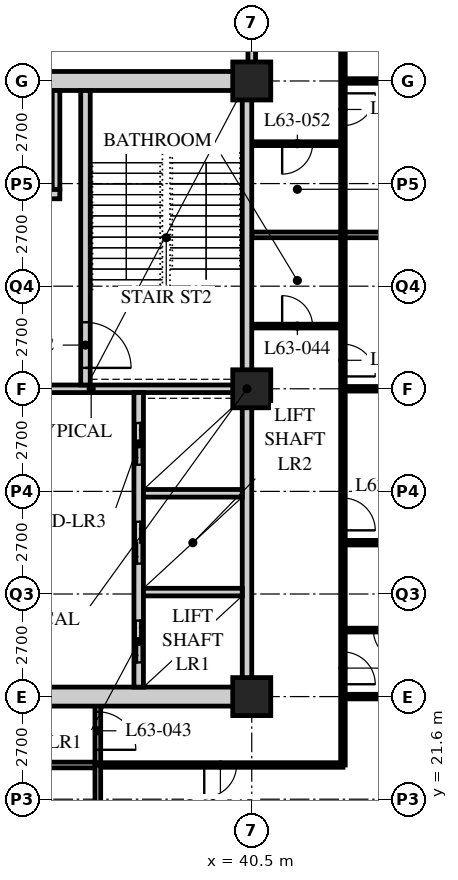
"""IFC4 building model, lengths in metres.
Left out: names, types, materials, properties, quantities, classifications, styles, units other than length and angle.
Written with IfcOpenShell. Run it as: python <this file> out.ifc"""

import sys

from ifc_helpers import new_model, si_unit, direction, frame, frame_2d, origin, origin_2d, place, context, subcontext, project, spatial, rectangle, hollow_rectangle, extrude, element, fill, save


model = new_model("IFC4")
c1 = context("Model", 3, precision=1e-05, world=origin(), true_north=direction((0.0, 1.0)))
c2 = subcontext(c1, "Body", "Model", "MODEL_VIEW")
j1 = project(units=[si_unit("LENGTHUNIT", "METRE"), si_unit("PLANEANGLEUNIT", "RADIAN")], contexts=[c1])
p1 = place(None, origin())
s1 = spatial("IfcSite", under=j1, at=p1, CompositionType="ELEMENT")
p2 = place(p1, origin())
s2 = spatial("IfcBuilding", under=s1, at=p2, CompositionType="ELEMENT")
p3 = place(p2, frame((0.0, 0.0, 246.3)))
s3 = spatial("IfcBuildingStorey", under=s2, at=p3, CompositionType="ELEMENT", Elevation=246.3)
for number, where, z_axis, x_axis in (
    (1, (40.5, 24.3, 0.0), (0.0, 0.0, 1.0), (1.0, 0.0, 0.0)),
    (2, (40.5, 32.4, 0.0), (0.0, 0.0, 1.0), (1.0, 0.0, 0.0)),
    (3, (40.5, 40.5, 0.0), (0.0, 0.0, 1.0), (1.0, 0.0, 0.0)),
):
    element("IfcColumn", number, at=place(p3, frame(where, z_axis=z_axis, x_axis=x_axis)), inside=s3, PredefinedType="COLUMN", context=c2, shape_type="SweptSolid", body=[
        extrude(hollow_rectangle(XDim=1.0, YDim=1.0, WallThickness=0.1, at=origin_2d()), origin(), (0.0, 0.0, 1.0), 3.9),
    ])
p4 = place(p3, frame((12.15, 22.5, 0.0), z_axis=(0.0, 0.0, 1.0), x_axis=(1.0, 0.0, 0.0)))
e4 = element("IfcWall", 4, at=p4, inside=s3, PredefinedType="PARTITIONING", context=c2, shape_type="SweptSolid", body=[
    extrude(rectangle(XDim=24.3, YDim=0.15, at=frame_2d((12.15, 0.0))), origin(), (0.0, 0.0, 1.0), 3.69),
])
p5 = place(p4, frame((6.4, 0.0, 0.0)))
e5 = element("IfcOpeningElement", 5, at=p5, cuts=e4, PredefinedType="OPENING", context=c2, shape_type="SweptSolid", body=[
    extrude(rectangle(XDim=1.0, YDim=2.1, at=frame_2d((0.5, 1.05))), frame((0.0, 0.085, 0.0), z_axis=(0.0, -1.0, 0.0), x_axis=(1.0, 0.0, 0.0)), (0.0, 0.0, 1.0), 0.17),
])
p6 = place(p4, frame((8.5, 0.0, 0.0)))
e6 = element("IfcOpeningElement", 6, at=p6, cuts=e4, PredefinedType="OPENING", context=c2, shape_type="SweptSolid", body=[
    extrude(rectangle(XDim=1.0, YDim=2.1, at=frame_2d((0.5, 1.05))), frame((0.0, 0.085, 0.0), z_axis=(0.0, -1.0, 0.0), x_axis=(1.0, 0.0, 0.0)), (0.0, 0.0, 1.0), 0.17),
])
p7 = place(p4, frame((16.6, 0.0, 0.0)))
e7 = element("IfcOpeningElement", 7, at=p7, cuts=e4, PredefinedType="OPENING", context=c2, shape_type="SweptSolid", body=[
    extrude(rectangle(XDim=1.0, YDim=2.1, at=frame_2d((0.5, 1.05))), frame((0.0, 0.085, 0.0), z_axis=(0.0, -1.0, 0.0), x_axis=(1.0, 0.0, 0.0)), (0.0, 0.0, 1.0), 0.17),
])
p8 = place(p4, frame((2.625, 0.0, 0.0)))
e8 = element("IfcOpeningElement", 8, at=p8, cuts=e4, PredefinedType="OPENING", context=c2, shape_type="SweptSolid", body=[
    extrude(rectangle(XDim=1.0, YDim=2.1, at=frame_2d((0.5, 1.05))), frame((0.0, 0.085, 0.0), z_axis=(0.0, -1.0, 0.0), x_axis=(1.0, 0.0, 0.0)), (0.0, 0.0, 1.0), 0.17),
])
p9 = place(p3, frame((36.45, 22.5, 0.0), z_axis=(0.0, 0.0, 1.0), x_axis=(0.0, 1.0, 0.0)))
e9 = element("IfcWall", 9, at=p9, inside=s3, PredefinedType="PARTITIONING", context=c2, shape_type="SweptSolid", body=[
    extrude(rectangle(XDim=1.8, YDim=0.15, at=frame_2d((0.9, 0.0))), origin(), (0.0, 0.0, 1.0), 3.69),
])
p10 = place(p9, frame((0.4, 0.0, 0.0)))
e10 = element("IfcOpeningElement", 10, at=p10, cuts=e9, PredefinedType="OPENING", context=c2, shape_type="SweptSolid", body=[
    extrude(rectangle(XDim=1.0, YDim=2.1, at=frame_2d((0.5, 1.05))), frame((0.0, 0.085, 0.0), z_axis=(0.0, -1.0, 0.0), x_axis=(1.0, 0.0, 0.0)), (0.0, 0.0, 1.0), 0.17),
])
p11 = place(p3, frame((40.5, 40.5, 0.0), z_axis=(0.0, 0.0, 1.0), x_axis=(0.0, 1.0, 0.0)))
e11 = element("IfcWall", 11, at=p11, inside=s3, PredefinedType="SOLIDWALL", context=c2, shape_type="SweptSolid", body=[
    extrude(rectangle(XDim=10.35, YDim=0.2, at=frame_2d((5.175, 0.0))), origin(), (0.0, 0.0, 1.0), 3.078),
])
p12 = place(p3, frame((40.5, 34.05, 0.0), z_axis=(0.0, 0.0, 1.0), x_axis=(1.0, 0.0, 0.0)))
e12 = element("IfcWall", 12, at=p12, inside=s3, PredefinedType="PARTITIONING", context=c2, shape_type="SweptSolid", body=[
    extrude(rectangle(XDim=2.4, YDim=0.1, at=frame_2d((1.2, 0.0))), origin(), (0.0, 0.0, 1.0), 3.69),
])
p13 = place(p12, frame((0.8, 0.0, 0.0)))
e13 = element("IfcOpeningElement", 13, at=p13, cuts=e12, PredefinedType="OPENING", context=c2, shape_type="SweptSolid", body=[
    extrude(rectangle(XDim=0.8, YDim=2.1, at=frame_2d((0.4, 1.05))), frame((0.0, 0.06, 0.0), z_axis=(0.0, -1.0, 0.0), x_axis=(1.0, 0.0, 0.0)), (0.0, 0.0, 1.0), 0.12),
])
p14 = place(p3, frame((42.9, 22.5, 0.0), z_axis=(0.0, 0.0, 1.0), x_axis=(0.0, 1.0, 0.0)))
e14 = element("IfcWall", 14, at=p14, inside=s3, PredefinedType="PARTITIONING", context=c2, shape_type="SweptSolid", body=[
    extrude(rectangle(XDim=13.95, YDim=0.12, at=frame_2d((6.975, 0.0))), origin(), (0.0, 0.0, 1.0), 3.69),
])
p15 = place(p14, frame((2.125, 0.0, 0.0)))
e15 = element("IfcOpeningElement", 15, at=p15, cuts=e14, PredefinedType="OPENING", context=c2, shape_type="SweptSolid", body=[
    extrude(rectangle(XDim=0.85, YDim=2.1, at=frame_2d((0.425, 1.05))), frame((0.0, 0.07, 0.0), z_axis=(0.0, -1.0, 0.0), x_axis=(1.0, 0.0, 0.0)), (0.0, 0.0, 1.0), 0.14),
])
p16 = place(p14, frame((6.175, 0.0, 0.0)))
e16 = element("IfcOpeningElement", 16, at=p16, cuts=e14, PredefinedType="OPENING", context=c2, shape_type="SweptSolid", body=[
    extrude(rectangle(XDim=0.85, YDim=2.1, at=frame_2d((0.425, 1.05))), frame((0.0, 0.07, 0.0), z_axis=(0.0, -1.0, 0.0), x_axis=(1.0, 0.0, 0.0)), (0.0, 0.0, 1.0), 0.14),
])
p17 = place(p14, frame((10.225, 0.0, 0.0)))
e17 = element("IfcOpeningElement", 17, at=p17, cuts=e14, PredefinedType="OPENING", context=c2, shape_type="SweptSolid", body=[
    extrude(rectangle(XDim=0.85, YDim=2.1, at=frame_2d((0.425, 1.05))), frame((0.0, 0.07, 0.0), z_axis=(0.0, -1.0, 0.0), x_axis=(1.0, 0.0, 0.0)), (0.0, 0.0, 1.0), 0.14),
])
p18 = place(p3, frame((36.45, 22.5, 0.0), z_axis=(0.0, 0.0, 1.0), x_axis=(1.0, 0.0, 0.0)))
e18 = element("IfcWall", 18, at=p18, inside=s3, PredefinedType="PARTITIONING", context=c2, shape_type="SweptSolid", body=[
    extrude(rectangle(XDim=6.45, YDim=0.12, at=frame_2d((3.225, 0.0))), origin(), (0.0, 0.0, 1.0), 3.69),
])
p19 = place(p18, frame((2.8, 0.0, 0.0)))
e19 = element("IfcOpeningElement", 19, at=p19, cuts=e18, PredefinedType="OPENING", context=c2, shape_type="SweptSolid", body=[
    extrude(rectangle(XDim=0.85, YDim=2.1, at=frame_2d((0.425, 1.05))), frame((0.0, 0.07, 0.0), z_axis=(0.0, -1.0, 0.0), x_axis=(1.0, 0.0, 0.0)), (0.0, 0.0, 1.0), 0.14),
])
p20 = place(p3, frame((42.9, 24.3, 0.0), z_axis=(0.0, 0.0, 1.0), x_axis=(1.0, 0.0, 0.0)))
e20 = element("IfcWall", 20, at=p20, inside=s3, PredefinedType="PARTITIONING", context=c2, shape_type="SweptSolid", body=[
    extrude(rectangle(XDim=9.45, YDim=0.12, at=frame_2d((4.725, 0.0))), origin(), (0.0, 0.0, 1.0), 3.078),
])
p21 = place(p3, frame((40.5, 36.45, 0.0), z_axis=(0.0, 0.0, 1.0), x_axis=(1.0, 0.0, 0.0)))
e21 = element("IfcWall", 21, at=p21, inside=s3, PredefinedType="PARTITIONING", context=c2, shape_type="SweptSolid", body=[
    extrude(rectangle(XDim=15.9, YDim=0.15, at=frame_2d((7.95, 0.0))), origin(), (0.0, 0.0, 1.0), 3.69),
])
p22 = place(p3, frame((36.45, 16.5, 0.0), z_axis=(0.0, 0.0, 1.0), x_axis=(0.0, 1.0, 0.0)))
e22 = element("IfcWall", 22, at=p22, inside=s3, PredefinedType="PARTITIONING", context=c2, shape_type="SweptSolid", body=[
    extrude(rectangle(XDim=6.0, YDim=0.15, at=frame_2d((3.0, 0.0))), origin(), (0.0, 0.0, 1.0), 3.69),
])
p23 = place(p3, frame((42.9, 26.05, 0.0), z_axis=(0.0, 0.0, 1.0), x_axis=(1.0, 0.0, 0.0)))
e23 = element("IfcWall", 23, at=p23, inside=s3, PredefinedType="PARTITIONING", context=c2, shape_type="SweptSolid", body=[
    extrude(rectangle(XDim=2.4, YDim=0.1, at=frame_2d((1.2, 0.0))), origin(), (0.0, 0.0, 1.0), 3.69),
])
p24 = place(p23, frame((0.8, 0.0, 0.0)))
e24 = element("IfcOpeningElement", 24, at=p24, cuts=e23, PredefinedType="OPENING", context=c2, shape_type="SweptSolid", body=[
    extrude(rectangle(XDim=0.8, YDim=2.1, at=frame_2d((0.4, 1.05))), frame((0.0, 0.06, 0.0), z_axis=(0.0, -1.0, 0.0), x_axis=(1.0, 0.0, 0.0)), (0.0, 0.0, 1.0), 0.12),
])
p25 = place(p3, frame((42.9, 28.35, 0.0), z_axis=(0.0, 0.0, 1.0), x_axis=(1.0, 0.0, 0.0)))
e25 = element("IfcWall", 25, at=p25, inside=s3, PredefinedType="PARTITIONING", context=c2, shape_type="SweptSolid", body=[
    extrude(rectangle(XDim=13.5, YDim=0.12, at=frame_2d((6.75, 0.0))), origin(), (0.0, 0.0, 1.0), 3.69),
])
p26 = place(p3, frame((42.9, 32.4, 0.0), z_axis=(0.0, 0.0, 1.0), x_axis=(1.0, 0.0, 0.0)))
e26 = element("IfcWall", 26, at=p26, inside=s3, PredefinedType="PARTITIONING", context=c2, shape_type="SweptSolid", body=[
    extrude(rectangle(XDim=13.5, YDim=0.12, at=frame_2d((6.75, 0.0))), origin(), (0.0, 0.0, 1.0), 3.078),
])
p27 = place(p3, frame((40.5, 38.85, 0.0), z_axis=(0.0, 0.0, 1.0), x_axis=(1.0, 0.0, 0.0)))
e27 = element("IfcWall", 27, at=p27, inside=s3, PredefinedType="PARTITIONING", context=c2, shape_type="SweptSolid", body=[
    extrude(rectangle(XDim=2.4, YDim=0.1, at=frame_2d((1.2, 0.0))), origin(), (0.0, 0.0, 1.0), 3.69),
])
p28 = place(p27, frame((0.8, 0.0, 0.0)))
e28 = element("IfcOpeningElement", 28, at=p28, cuts=e27, PredefinedType="OPENING", context=c2, shape_type="SweptSolid", body=[
    extrude(rectangle(XDim=0.8, YDim=2.1, at=frame_2d((0.4, 1.05))), frame((0.0, 0.06, 0.0), z_axis=(0.0, -1.0, 0.0), x_axis=(1.0, 0.0, 0.0)), (0.0, 0.0, 1.0), 0.12),
])
p29 = place(p3, frame((42.9, 52.65, 0.0), z_axis=(0.0, 0.0, 1.0), x_axis=(0.0, -1.0, 0.0)))
e29 = element("IfcWall", 29, at=p29, inside=s3, PredefinedType="PARTITIONING", context=c2, shape_type="SweptSolid", body=[
    extrude(rectangle(XDim=16.2, YDim=0.12, at=frame_2d((8.1, 0.0))), origin(), (0.0, 0.0, 1.0), 3.69),
])
p30 = place(p29, frame((2.125, 0.0, 0.0)))
e30 = element("IfcOpeningElement", 30, at=p30, cuts=e29, PredefinedType="OPENING", context=c2, shape_type="SweptSolid", body=[
    extrude(rectangle(XDim=0.85, YDim=2.1, at=frame_2d((0.425, 1.05))), frame((0.0, 0.07, 0.0), z_axis=(0.0, -1.0, 0.0), x_axis=(1.0, 0.0, 0.0)), (0.0, 0.0, 1.0), 0.14),
])
p31 = place(p29, frame((8.425, 0.0, 0.0)))
e31 = element("IfcOpeningElement", 31, at=p31, cuts=e29, PredefinedType="OPENING", context=c2, shape_type="SweptSolid", body=[
    extrude(rectangle(XDim=0.85, YDim=2.1, at=frame_2d((0.425, 1.05))), frame((0.0, 0.07, 0.0), z_axis=(0.0, -1.0, 0.0), x_axis=(1.0, 0.0, 0.0)), (0.0, 0.0, 1.0), 0.14),
])
p32 = place(p29, frame((12.475, 0.0, 0.0)))
e32 = element("IfcOpeningElement", 32, at=p32, cuts=e29, PredefinedType="OPENING", context=c2, shape_type="SweptSolid", body=[
    extrude(rectangle(XDim=0.85, YDim=2.1, at=frame_2d((0.425, 1.05))), frame((0.0, 0.07, 0.0), z_axis=(0.0, -1.0, 0.0), x_axis=(1.0, 0.0, 0.0)), (0.0, 0.0, 1.0), 0.14),
])
p33 = place(p3, frame((42.9, 40.5, 0.0), z_axis=(0.0, 0.0, 1.0), x_axis=(1.0, 0.0, 0.0)))
e33 = element("IfcWall", 33, at=p33, inside=s3, PredefinedType="PARTITIONING", context=c2, shape_type="SweptSolid", body=[
    extrude(rectangle(XDim=13.5, YDim=0.12, at=frame_2d((6.75, 0.0))), origin(), (0.0, 0.0, 1.0), 3.078),
])
p34 = place(p3, frame((15.95, 24.3, 0.0), z_axis=(0.0, 0.0, 1.0), x_axis=(1.0, 0.0, 0.0)))
e34 = element("IfcWall", 34, at=p34, inside=s3, PredefinedType="SOLIDWALL", context=c2, shape_type="SweptSolid", body=[
    extrude(rectangle(XDim=24.55, YDim=0.5, at=frame_2d((12.275, 0.0))), origin(), (0.0, 0.0, 1.0), 3.04),
])
p35 = place(p34, frame((11.5, 0.0, 0.0)))
e35 = element("IfcOpeningElement", 35, at=p35, cuts=e34, PredefinedType="OPENING", context=c2, shape_type="SweptSolid", body=[
    extrude(rectangle(XDim=1.8, YDim=2.4, at=frame_2d((0.9, 1.2))), frame((0.0, 0.26, 0.0), z_axis=(0.0, -1.0, 0.0), x_axis=(1.0, 0.0, 0.0)), (0.0, 0.0, 1.0), 0.52),
])
p36 = place(p3, frame((15.95, 40.5, 0.0), z_axis=(0.0, 0.0, 1.0), x_axis=(1.0, 0.0, 0.0)))
e36 = element("IfcWall", 36, at=p36, inside=s3, PredefinedType="SOLIDWALL", context=c2, shape_type="SweptSolid", body=[
    extrude(rectangle(XDim=24.55, YDim=0.5, at=frame_2d((12.275, 0.0))), origin(), (0.0, 0.0, 1.0), 3.04),
])
p37 = place(p36, frame((11.5, 0.0, 0.0)))
e37 = element("IfcOpeningElement", 37, at=p37, cuts=e36, PredefinedType="OPENING", context=c2, shape_type="SweptSolid", body=[
    extrude(rectangle(XDim=1.8, YDim=2.4, at=frame_2d((0.9, 1.2))), frame((0.0, 0.26, 0.0), z_axis=(0.0, -1.0, 0.0), x_axis=(1.0, 0.0, 0.0)), (0.0, 0.0, 1.0), 0.52),
])
p38 = place(p3, frame((40.375, 24.55, 0.0), z_axis=(0.0, 0.0, 1.0), x_axis=(0.0, 1.0, 0.0)))
e38 = element("IfcWall", 38, at=p38, inside=s3, PredefinedType="SOLIDWALL", context=c2, shape_type="SweptSolid", body=[
    extrude(rectangle(XDim=15.7, YDim=0.25, at=frame_2d((7.85, 0.0))), origin(), (0.0, 0.0, 1.0), 3.078),
])
p39 = place(p3, frame((32.3, 32.4, 0.0), z_axis=(0.0, 0.0, 1.0), x_axis=(1.0, 0.0, 0.0)))
e39 = element("IfcWall", 39, at=p39, inside=s3, PredefinedType="SOLIDWALL", context=c2, shape_type="SweptSolid", body=[
    extrude(rectangle(XDim=7.95, YDim=0.2, at=frame_2d((3.975, 0.0))), origin(), (0.0, 0.0, 1.0), 3.078),
])
p40 = place(p3, frame((37.525, 24.55, 0.0), z_axis=(0.0, 0.0, 1.0), x_axis=(0.0, 1.0, 0.0)))
e40 = element("IfcWall", 40, at=p40, inside=s3, PredefinedType="SOLIDWALL", context=c2, shape_type="SweptSolid", body=[
    extrude(rectangle(XDim=7.75, YDim=0.25, at=frame_2d((3.875, 0.0))), origin(), (0.0, 0.0, 1.0), 3.69),
])
p41 = place(p40, frame((0.65, 0.0, 0.0)))
e41 = element("IfcOpeningElement", 41, at=p41, cuts=e40, PredefinedType="OPENING", context=c2, shape_type="SweptSolid", body=[
    extrude(rectangle(XDim=1.1, YDim=2.4, at=frame_2d((0.55, 1.2))), frame((0.0, 0.135, 0.0), z_axis=(0.0, -1.0, 0.0), x_axis=(1.0, 0.0, 0.0)), (0.0, 0.0, 1.0), 0.27),
])
p42 = place(p40, frame((3.25, 0.0, 0.0)))
e42 = element("IfcOpeningElement", 42, at=p42, cuts=e40, PredefinedType="OPENING", context=c2, shape_type="SweptSolid", body=[
    extrude(rectangle(XDim=1.1, YDim=2.4, at=frame_2d((0.55, 1.2))), frame((0.0, 0.135, 0.0), z_axis=(0.0, -1.0, 0.0), x_axis=(1.0, 0.0, 0.0)), (0.0, 0.0, 1.0), 0.27),
])
p43 = place(p40, frame((5.85, 0.0, 0.0)))
e43 = element("IfcOpeningElement", 43, at=p43, cuts=e40, PredefinedType="OPENING", context=c2, shape_type="SweptSolid", body=[
    extrude(rectangle(XDim=1.1, YDim=2.4, at=frame_2d((0.55, 1.2))), frame((0.0, 0.135, 0.0), z_axis=(0.0, -1.0, 0.0), x_axis=(1.0, 0.0, 0.0)), (0.0, 0.0, 1.0), 0.27),
])
for number, where, z_axis, x_axis in (
    (44, (37.65, 27.05, 0.0), (0.0, 0.0, 1.0), (1.0, 0.0, 0.0)),
    (45, (37.65, 29.65, 0.0), (0.0, 0.0, 1.0), (1.0, 0.0, 0.0)),
):
    element("IfcWall", number, at=place(p3, frame(where, z_axis=z_axis, x_axis=x_axis)), inside=s3, PredefinedType="SOLIDWALL", context=c2, shape_type="SweptSolid", body=[
        extrude(rectangle(XDim=2.6, YDim=0.2, at=frame_2d((1.3, 0.0))), origin(), (0.0, 0.0, 1.0), 3.69),
    ])
p44 = place(p3, frame((36.125, 32.5, 0.0), z_axis=(0.0, 0.0, 1.0), x_axis=(0.0, 1.0, 0.0)))
e46 = element("IfcWall", 46, at=p44, inside=s3, PredefinedType="SOLIDWALL", context=c2, shape_type="SweptSolid", body=[
    extrude(rectangle(XDim=7.75, YDim=0.25, at=frame_2d((3.875, 0.0))), origin(), (0.0, 0.0, 1.0), 3.69),
])
p45 = place(p44, frame((0.45, 0.0, 0.0)))
e47 = element("IfcOpeningElement", 47, at=p45, cuts=e46, PredefinedType="OPENING", context=c2, shape_type="SweptSolid", body=[
    extrude(rectangle(XDim=1.2, YDim=2.1, at=frame_2d((0.6, 1.05))), frame((0.0, 0.135, 0.0), z_axis=(0.0, -1.0, 0.0), x_axis=(1.0, 0.0, 0.0)), (0.0, 0.0, 1.0), 0.27),
])
p46 = place(p3, frame((32.5, 37.525, 0.0), z_axis=(0.0, 0.0, 1.0), x_axis=(1.0, 0.0, 0.0)))
e48 = element("IfcWall", 48, at=p46, inside=s3, PredefinedType="SOLIDWALL", context=c2, shape_type="SweptSolid", body=[
    extrude(rectangle(XDim=2.95, YDim=0.25, at=frame_2d((1.475, 0.0))), origin(), (0.0, 0.0, 1.0), 3.69),
])
p47 = place(p46, frame((0.9, 0.0, 0.0)))
e49 = element("IfcOpeningElement", 49, at=p47, cuts=e48, PredefinedType="OPENING", context=c2, shape_type="SweptSolid", body=[
    extrude(rectangle(XDim=1.1, YDim=2.4, at=frame_2d((0.55, 1.2))), frame((0.0, 0.135, 0.0), z_axis=(0.0, -1.0, 0.0), x_axis=(1.0, 0.0, 0.0)), (0.0, 0.0, 1.0), 0.27),
])
p48 = place(p3, frame((35.35, 37.65, 0.0), z_axis=(0.0, 0.0, 1.0), x_axis=(0.0, 1.0, 0.0)))
e50 = element("IfcWall", 50, at=p48, inside=s3, PredefinedType="SOLIDWALL", context=c2, shape_type="SweptSolid", body=[
    extrude(rectangle(XDim=2.6, YDim=0.2, at=frame_2d((1.3, 0.0))), origin(), (0.0, 0.0, 1.0), 3.69),
])
p49 = place(p10, origin())
e51 = element("IfcDoor", 51, at=p49, inside=s3, OperationType="SINGLE_SWING_RIGHT", PredefinedType="DOOR", context=c2, shape_type="SweptSolid", body=[
    extrude(rectangle(XDim=1.0, YDim=2.1, at=frame_2d((0.5, 1.05))), frame((0.0, 0.025, 0.0), z_axis=(0.0, -1.0, 0.0), x_axis=(1.0, 0.0, 0.0)), (0.0, 0.0, 1.0), 0.05),
])
fill(e10, e51)
p50 = place(p13, origin())
e52 = element("IfcDoor", 52, at=p50, inside=s3, OperationType="SINGLE_SWING_LEFT", PredefinedType="DOOR", context=c2, shape_type="SweptSolid", body=[
    extrude(rectangle(XDim=0.8, YDim=2.1, at=frame_2d((0.4, 1.05))), frame((0.0, 0.025, 0.0), z_axis=(0.0, -1.0, 0.0), x_axis=(1.0, 0.0, 0.0)), (0.0, 0.0, 1.0), 0.05),
])
fill(e13, e52)
p51 = place(p19, origin())
e53 = element("IfcDoor", 53, at=p51, inside=s3, OperationType="SINGLE_SWING_RIGHT", PredefinedType="DOOR", context=c2, shape_type="SweptSolid", body=[
    extrude(rectangle(XDim=0.85, YDim=2.1, at=frame_2d((0.425, 1.05))), frame((0.0, 0.025, 0.0), z_axis=(0.0, -1.0, 0.0), x_axis=(1.0, 0.0, 0.0)), (0.0, 0.0, 1.0), 0.05),
])
fill(e19, e53)
p52 = place(p24, origin())
e54 = element("IfcDoor", 54, at=p52, inside=s3, OperationType="SINGLE_SWING_LEFT", PredefinedType="DOOR", context=c2, shape_type="SweptSolid", body=[
    extrude(rectangle(XDim=0.8, YDim=2.1, at=frame_2d((0.4, 1.05))), frame((0.0, 0.025, 0.0), z_axis=(0.0, -1.0, 0.0), x_axis=(1.0, 0.0, 0.0)), (0.0, 0.0, 1.0), 0.05),
])
fill(e24, e54)
p53 = place(p15, origin())
e55 = element("IfcDoor", 55, at=p53, inside=s3, OperationType="SINGLE_SWING_RIGHT", PredefinedType="DOOR", context=c2, shape_type="SweptSolid", body=[
    extrude(rectangle(XDim=0.85, YDim=2.1, at=frame_2d((0.425, 1.05))), frame((0.0, 0.025, 0.0), z_axis=(0.0, -1.0, 0.0), x_axis=(1.0, 0.0, 0.0)), (0.0, 0.0, 1.0), 0.05),
])
fill(e15, e55)
p54 = place(p16, origin())
e56 = element("IfcDoor", 56, at=p54, inside=s3, OperationType="SINGLE_SWING_RIGHT", PredefinedType="DOOR", context=c2, shape_type="SweptSolid", body=[
    extrude(rectangle(XDim=0.85, YDim=2.1, at=frame_2d((0.425, 1.05))), frame((0.0, 0.025, 0.0), z_axis=(0.0, -1.0, 0.0), x_axis=(1.0, 0.0, 0.0)), (0.0, 0.0, 1.0), 0.05),
])
fill(e16, e56)
p55 = place(p17, origin())
e57 = element("IfcDoor", 57, at=p55, inside=s3, OperationType="SINGLE_SWING_RIGHT", PredefinedType="DOOR", context=c2, shape_type="SweptSolid", body=[
    extrude(rectangle(XDim=0.85, YDim=2.1, at=frame_2d((0.425, 1.05))), frame((0.0, 0.025, 0.0), z_axis=(0.0, -1.0, 0.0), x_axis=(1.0, 0.0, 0.0)), (0.0, 0.0, 1.0), 0.05),
])
fill(e17, e57)
p56 = place(p28, origin())
e58 = element("IfcDoor", 58, at=p56, inside=s3, OperationType="SINGLE_SWING_RIGHT", PredefinedType="DOOR", context=c2, shape_type="SweptSolid", body=[
    extrude(rectangle(XDim=0.8, YDim=2.1, at=frame_2d((0.4, 1.05))), frame((0.0, 0.025, 0.0), z_axis=(0.0, -1.0, 0.0), x_axis=(1.0, 0.0, 0.0)), (0.0, 0.0, 1.0), 0.05),
])
fill(e28, e58)
p57 = place(p32, origin())
e59 = element("IfcDoor", 59, at=p57, inside=s3, OperationType="SINGLE_SWING_LEFT", PredefinedType="DOOR", context=c2, shape_type="SweptSolid", body=[
    extrude(rectangle(XDim=0.85, YDim=2.1, at=frame_2d((0.425, 1.05))), frame((0.0, 0.025, 0.0), z_axis=(0.0, -1.0, 0.0), x_axis=(1.0, 0.0, 0.0)), (0.0, 0.0, 1.0), 0.05),
])
fill(e32, e59)
p58 = place(p45, origin())
e60 = element("IfcDoor", 60, at=p58, inside=s3, OperationType="SINGLE_SWING_RIGHT", PredefinedType="DOOR", context=c2, shape_type="SweptSolid", body=[
    extrude(rectangle(XDim=1.2, YDim=2.1, at=frame_2d((0.6, 1.05))), frame((0.0, 0.025, 0.0), z_axis=(0.0, -1.0, 0.0), x_axis=(1.0, 0.0, 0.0)), (0.0, 0.0, 1.0), 0.05),
])
fill(e47, e60)
p59 = place(p41, origin())
e61 = element("IfcDoor", 61, at=p59, inside=s3, OperationType="DOUBLE_DOOR_SLIDING", PredefinedType="DOOR", context=c2, shape_type="SweptSolid", body=[
    extrude(rectangle(XDim=1.1, YDim=2.4, at=frame_2d((0.55, 1.2))), frame((0.0, 0.025, 0.0), z_axis=(0.0, -1.0, 0.0), x_axis=(1.0, 0.0, 0.0)), (0.0, 0.0, 1.0), 0.05),
])
fill(e41, e61)
p60 = place(p42, origin())
e62 = element("IfcDoor", 62, at=p60, inside=s3, OperationType="DOUBLE_DOOR_SLIDING", PredefinedType="DOOR", context=c2, shape_type="SweptSolid", body=[
    extrude(rectangle(XDim=1.1, YDim=2.4, at=frame_2d((0.55, 1.2))), frame((0.0, 0.025, 0.0), z_axis=(0.0, -1.0, 0.0), x_axis=(1.0, 0.0, 0.0)), (0.0, 0.0, 1.0), 0.05),
])
fill(e42, e62)
p61 = place(p43, origin())
e63 = element("IfcDoor", 63, at=p61, inside=s3, OperationType="DOUBLE_DOOR_SLIDING", PredefinedType="DOOR", context=c2, shape_type="SweptSolid", body=[
    extrude(rectangle(XDim=1.1, YDim=2.4, at=frame_2d((0.55, 1.2))), frame((0.0, 0.025, 0.0), z_axis=(0.0, -1.0, 0.0), x_axis=(1.0, 0.0, 0.0)), (0.0, 0.0, 1.0), 0.05),
])
fill(e43, e63)
save(model, sys.argv[1])
